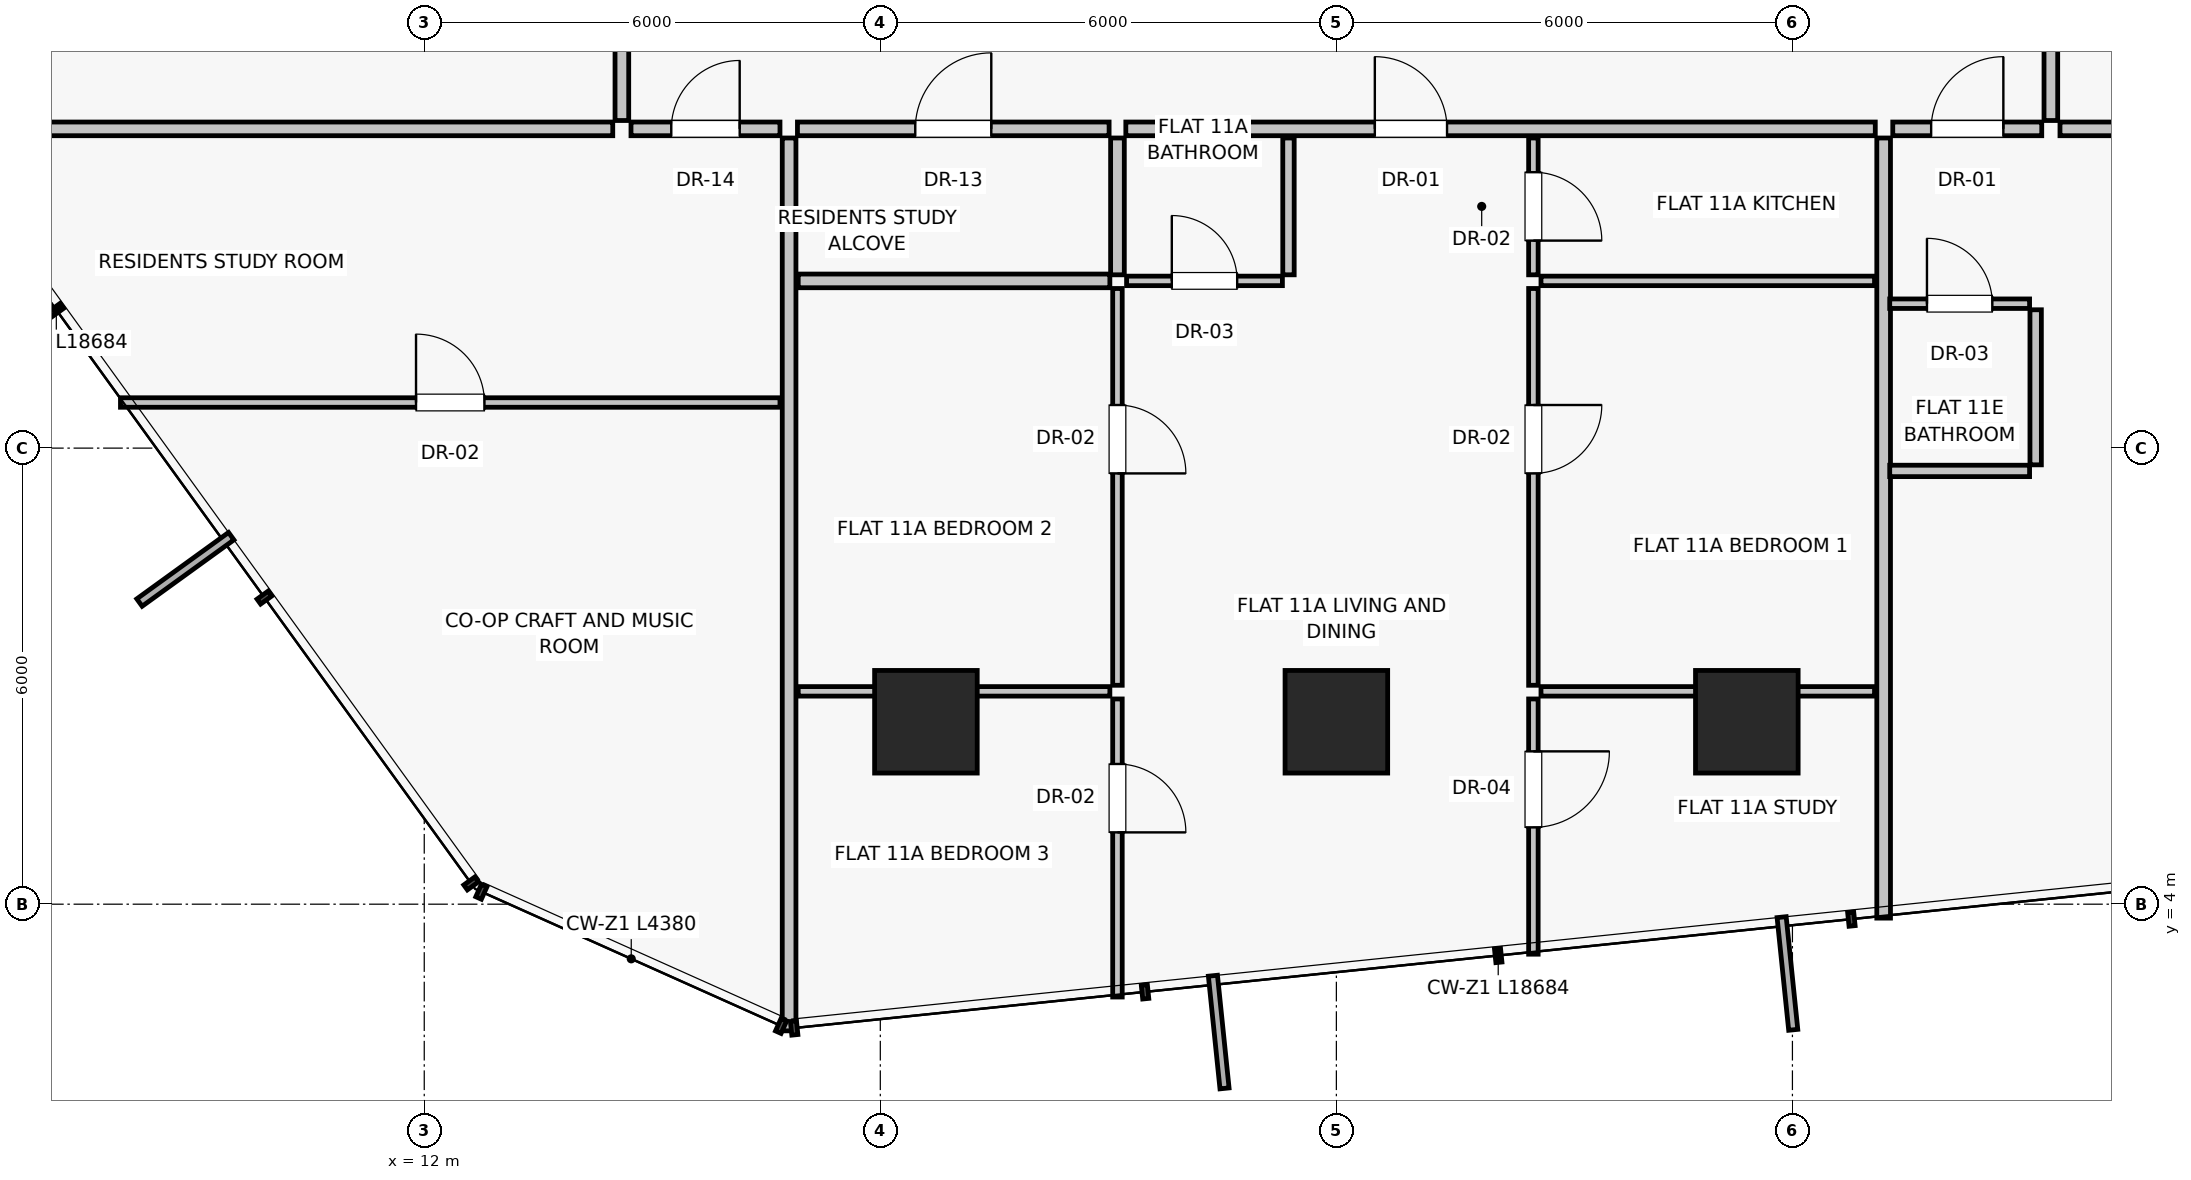
"""IFC4 building model, lengths in metres.
Left out: names, types, materials, properties, quantities, classifications, styles, units other than length and angle.
Written with IfcOpenShell. Run it as: python <this file> out.ifc"""

import sys

from ifc_helpers import new_model, si_unit, direction, frame, frame_2d, origin, origin_2d, place, context, subcontext, project, spatial, rectangle, extrude, source, transform, mapped, element, fill, save


model = new_model("IFC4")
c1 = context("Model", 3, precision=1e-05, world=origin(), true_north=direction((0.0, 1.0)))
c2 = subcontext(c1, "Body", "Model", "MODEL_VIEW")
j1 = project(units=[si_unit("LENGTHUNIT", "METRE"), si_unit("PLANEANGLEUNIT", "RADIAN")], contexts=[c1])
p1 = place(None, origin())
s1 = spatial("IfcSite", under=j1, at=p1, CompositionType="ELEMENT")
p2 = place(p1, origin())
s2 = spatial("IfcBuilding", under=s1, at=p2, CompositionType="ELEMENT")
p3 = place(p2, frame((0.0, 0.0, 43.55)))
s3 = spatial("IfcBuildingStorey", under=s2, at=p3, CompositionType="ELEMENT", Elevation=43.55)
for number, where, z_axis, x_axis in (
    (1, (18.6, 6.4, 0.0), (0.0, 0.0, 1.0), (1.0, 0.0, 0.0)),
    (2, (24.0, 6.4, 0.0), (0.0, 0.0, 1.0), (1.0, 0.0, 0.0)),
    (3, (29.4, 6.4, 0.0), (0.0, 0.0, 1.0), (1.0, 0.0, 0.0)),
):
    element("IfcColumn", number, at=place(p3, frame(where, z_axis=z_axis, x_axis=x_axis)), inside=s3, PredefinedType="COLUMN", context=c2, shape_type="SweptSolid", body=[
        extrude(rectangle(XDim=1.35, YDim=1.35, at=origin_2d()), origin(), (0.0, 0.0, 1.0), 3.25),
    ])
p4 = place(p3, frame((16.8, 14.08, 0.0), z_axis=(0.0, 0.0, 1.0), x_axis=(0.0, -1.0, 0.0)))
e4 = element("IfcWall", 4, at=p4, inside=s3, PredefinedType="PARTITIONING", context=c2, shape_type="SweptSolid", body=[
    extrude(rectangle(XDim=11.746, YDim=0.18, at=frame_2d((5.873, 0.0))), origin(), (0.0, 0.0, 1.0), 3.0),
])
p5 = place(p3, frame((31.2, 14.08, 0.0), z_axis=(0.0, 0.0, 1.0), x_axis=(0.0, -1.0, 0.0)))
e5 = element("IfcWall", 5, at=p5, inside=s3, PredefinedType="PARTITIONING", context=c2, shape_type="SweptSolid", body=[
    extrude(rectangle(XDim=10.263, YDim=0.18, at=frame_2d((5.132, 0.0))), origin(), (0.0, 0.0, 1.0), 3.0),
])
p6 = place(p3, frame((16.91, 14.2, 0.0), z_axis=(0.0, 0.0, 1.0), x_axis=(1.0, 0.0, 0.0)))
e6 = element("IfcWall", 6, at=p6, inside=s3, PredefinedType="PARTITIONING", context=c2, shape_type="SweptSolid", body=[
    extrude(rectangle(XDim=4.1, YDim=0.18, at=frame_2d((2.05, 0.0))), origin(), (0.0, 0.0, 1.0), 3.0),
])
p7 = place(p6, frame((1.55, 0.0, 0.0)))
e7 = element("IfcOpeningElement", 7, at=p7, cuts=e6, PredefinedType="OPENING", context=c2, shape_type="SweptSolid", body=[
    extrude(rectangle(XDim=1.0, YDim=2.01, at=frame_2d((0.5, 1.005))), frame((0.0, 0.1, 0.0), z_axis=(0.0, -1.0, 0.0), x_axis=(1.0, 0.0, 0.0)), (0.0, 0.0, 1.0), 0.2),
])
p8 = place(p3, frame((21.23, 14.2, 0.0), z_axis=(0.0, 0.0, 1.0), x_axis=(1.0, 0.0, 0.0)))
e8 = element("IfcWall", 8, at=p8, inside=s3, PredefinedType="PARTITIONING", context=c2, shape_type="SweptSolid", body=[
    extrude(rectangle(XDim=9.86, YDim=0.18, at=frame_2d((4.93, 0.0))), origin(), (0.0, 0.0, 1.0), 3.0),
])
p9 = place(p8, frame((3.276, 0.0, 0.0)))
e9 = element("IfcOpeningElement", 9, at=p9, cuts=e8, PredefinedType="OPENING", context=c2, shape_type="SweptSolid", body=[
    extrude(rectangle(XDim=0.95, YDim=2.02, at=frame_2d((0.475, 1.01))), frame((0.0, 0.1, 0.0), z_axis=(0.0, -1.0, 0.0), x_axis=(1.0, 0.0, 0.0)), (0.0, 0.0, 1.0), 0.2),
])
p10 = place(p3, frame((16.92, 6.8, 0.0), z_axis=(0.0, 0.0, 1.0), x_axis=(1.0, 0.0, 0.0)))
e10 = element("IfcWall", 10, at=p10, inside=s3, PredefinedType="PARTITIONING", context=c2, shape_type="SweptSolid", body=[
    extrude(rectangle(XDim=4.1, YDim=0.125, at=frame_2d((2.05, 0.0))), origin(), (0.0, 0.0, 1.0), 2.1),
])
p11 = place(p3, frame((21.12, 6.7, 0.0), z_axis=(0.0, 0.0, 1.0), x_axis=(0.0, -1.0, 0.0)))
e11 = element("IfcWall", 11, at=p11, inside=s3, PredefinedType="PARTITIONING", context=c2, shape_type="SweptSolid", body=[
    extrude(rectangle(XDim=3.921, YDim=0.125, at=frame_2d((1.96, 0.0))), origin(), (0.0, 0.0, 1.0), 3.0),
])
p12 = place(p11, frame((0.855, 0.0, 0.0)))
e12 = element("IfcOpeningElement", 12, at=p12, cuts=e11, PredefinedType="OPENING", context=c2, shape_type="SweptSolid", body=[
    extrude(rectangle(XDim=0.9, YDim=2.01, at=frame_2d((0.45, 1.005))), frame((0.0, 0.073, 0.0), z_axis=(0.0, -1.0, 0.0), x_axis=(1.0, 0.0, 0.0)), (0.0, 0.0, 1.0), 0.145),
])
p13 = place(p3, frame((26.692, 6.8, 0.0), z_axis=(0.0, 0.0, 1.0), x_axis=(1.0, 0.0, 0.0)))
e13 = element("IfcWall", 13, at=p13, inside=s3, PredefinedType="PARTITIONING", context=c2, shape_type="SweptSolid", body=[
    extrude(rectangle(XDim=4.388, YDim=0.125, at=frame_2d((2.194, 0.0))), origin(), (0.0, 0.0, 1.0), 2.1),
])
p14 = place(p3, frame((26.592, 6.7, 0.0), z_axis=(0.0, 0.0, 1.0), x_axis=(0.0, -1.0, 0.0)))
e14 = element("IfcWall", 14, at=p14, inside=s3, PredefinedType="PARTITIONING", context=c2, shape_type="SweptSolid", body=[
    extrude(rectangle(XDim=3.358, YDim=0.125, at=frame_2d((1.679, 0.0))), origin(), (0.0, 0.0, 1.0), 3.0),
])
p15 = place(p14, frame((0.689, 0.0, 0.0)))
e15 = element("IfcOpeningElement", 15, at=p15, cuts=e14, PredefinedType="OPENING", context=c2, shape_type="SweptSolid", body=[
    extrude(rectangle(XDim=1.0, YDim=2.01, at=frame_2d((0.5, 1.005))), frame((0.0, 0.073, 0.0), z_axis=(0.0, -1.0, 0.0), x_axis=(1.0, 0.0, 0.0)), (0.0, 0.0, 1.0), 0.145),
])
p16 = place(p3, frame((16.92, 12.2, 0.0), z_axis=(0.0, 0.0, 1.0), x_axis=(1.0, 0.0, 0.0)))
e16 = element("IfcWall", 16, at=p16, inside=s3, PredefinedType="PARTITIONING", context=c2, shape_type="SweptSolid", body=[
    extrude(rectangle(XDim=4.1, YDim=0.18, at=frame_2d((2.05, 0.0))), origin(), (0.0, 0.0, 1.0), 3.0),
])
p17 = place(p3, frame((21.12, 14.08, 0.0), z_axis=(0.0, 0.0, 1.0), x_axis=(0.0, -1.0, 0.0)))
e17 = element("IfcWall", 17, at=p17, inside=s3, PredefinedType="PARTITIONING", context=c2, shape_type="SweptSolid", body=[
    extrude(rectangle(XDim=1.8, YDim=0.18, at=frame_2d((0.9, 0.0))), origin(), (0.0, 0.0, 1.0), 3.0),
])
p18 = place(p3, frame((21.12, 12.1, 0.0), z_axis=(0.0, 0.0, 1.0), x_axis=(0.0, -1.0, 0.0)))
e18 = element("IfcWall", 18, at=p18, inside=s3, PredefinedType="PARTITIONING", context=c2, shape_type="SweptSolid", body=[
    extrude(rectangle(XDim=5.22, YDim=0.125, at=frame_2d((2.61, 0.0))), origin(), (0.0, 0.0, 1.0), 3.0),
])
p19 = place(p18, frame((1.533, 0.0, 0.0)))
e19 = element("IfcOpeningElement", 19, at=p19, cuts=e18, PredefinedType="OPENING", context=c2, shape_type="SweptSolid", body=[
    extrude(rectangle(XDim=0.9, YDim=2.01, at=frame_2d((0.45, 1.005))), frame((0.0, 0.073, 0.0), z_axis=(0.0, -1.0, 0.0), x_axis=(1.0, 0.0, 0.0)), (0.0, 0.0, 1.0), 0.145),
])
p20 = place(p3, frame((23.37, 14.08, 0.0), z_axis=(0.0, 0.0, 1.0), x_axis=(0.0, -1.0, 0.0)))
e20 = element("IfcWall", 20, at=p20, inside=s3, PredefinedType="PARTITIONING", context=c2, shape_type="SweptSolid", body=[
    extrude(rectangle(XDim=1.8, YDim=0.15, at=frame_2d((0.9, 0.0))), origin(), (0.0, 0.0, 1.0), 3.0),
])
p21 = place(p3, frame((21.24, 12.2, 0.0), z_axis=(0.0, 0.0, 1.0), x_axis=(1.0, 0.0, 0.0)))
e21 = element("IfcWall", 21, at=p21, inside=s3, PredefinedType="PARTITIONING", context=c2, shape_type="SweptSolid", body=[
    extrude(rectangle(XDim=2.05, YDim=0.125, at=frame_2d((1.025, 0.0))), origin(), (0.0, 0.0, 1.0), 3.0),
])
p22 = place(p21, frame((0.595, 0.0, 0.0)))
e22 = element("IfcOpeningElement", 22, at=p22, cuts=e21, PredefinedType="OPENING", context=c2, shape_type="SweptSolid", body=[
    extrude(rectangle(XDim=0.86, YDim=2.01, at=frame_2d((0.43, 1.005))), frame((0.0, 0.073, 0.0), z_axis=(0.0, -1.0, 0.0), x_axis=(1.0, 0.0, 0.0)), (0.0, 0.0, 1.0), 0.145),
])
p23 = place(p3, frame((26.592, 14.08, 0.0), z_axis=(0.0, 0.0, 1.0), x_axis=(0.0, -1.0, 0.0)))
e23 = element("IfcWall", 23, at=p23, inside=s3, PredefinedType="PARTITIONING", context=c2, shape_type="SweptSolid", body=[
    extrude(rectangle(XDim=1.8, YDim=0.125, at=frame_2d((0.9, 0.0))), origin(), (0.0, 0.0, 1.0), 3.0),
])
p24 = place(p23, frame((0.45, 0.0, 0.0)))
e24 = element("IfcOpeningElement", 24, at=p24, cuts=e23, PredefinedType="OPENING", context=c2, shape_type="SweptSolid", body=[
    extrude(rectangle(XDim=0.9, YDim=2.01, at=frame_2d((0.45, 1.005))), frame((0.0, 0.073, 0.0), z_axis=(0.0, -1.0, 0.0), x_axis=(1.0, 0.0, 0.0)), (0.0, 0.0, 1.0), 0.145),
])
p25 = place(p3, frame((26.692, 12.2, 0.0), z_axis=(0.0, 0.0, 1.0), x_axis=(1.0, 0.0, 0.0)))
e25 = element("IfcWall", 25, at=p25, inside=s3, PredefinedType="PARTITIONING", context=c2, shape_type="SweptSolid", body=[
    extrude(rectangle(XDim=4.388, YDim=0.125, at=frame_2d((2.194, 0.0))), origin(), (0.0, 0.0, 1.0), 3.0),
])
p26 = place(p3, frame((26.592, 12.1, 0.0), z_axis=(0.0, 0.0, 1.0), x_axis=(0.0, -1.0, 0.0)))
e26 = element("IfcWall", 26, at=p26, inside=s3, PredefinedType="PARTITIONING", context=c2, shape_type="SweptSolid", body=[
    extrude(rectangle(XDim=5.22, YDim=0.125, at=frame_2d((2.61, 0.0))), origin(), (0.0, 0.0, 1.0), 3.0),
])
p27 = place(p26, frame((1.533, 0.0, 0.0)))
e27 = element("IfcOpeningElement", 27, at=p27, cuts=e26, PredefinedType="OPENING", context=c2, shape_type="SweptSolid", body=[
    extrude(rectangle(XDim=0.9, YDim=2.01, at=frame_2d((0.45, 1.005))), frame((0.0, 0.073, 0.0), z_axis=(0.0, -1.0, 0.0), x_axis=(1.0, 0.0, 0.0)), (0.0, 0.0, 1.0), 0.145),
])
p28 = place(p3, frame((14.48, 14.2, 0.0), z_axis=(0.0, 0.0, 1.0), x_axis=(-1.0, 0.0, 0.0)))
e28 = element("IfcWall", 28, at=p28, inside=s3, PredefinedType="PARTITIONING", context=c2, shape_type="SweptSolid", body=[
    extrude(rectangle(XDim=9.08, YDim=0.18, at=frame_2d((4.54, 0.0))), origin(), (0.0, 0.0, 1.0), 3.0),
])
p29 = place(p3, frame((14.6, 14.31, 0.0), z_axis=(0.0, 0.0, 1.0), x_axis=(0.0, 1.0, 0.0)))
e29 = element("IfcWall", 29, at=p29, inside=s3, PredefinedType="PARTITIONING", context=c2, shape_type="SweptSolid", body=[
    extrude(rectangle(XDim=4.267, YDim=0.18, at=frame_2d((2.133, 0.0))), origin(), (0.0, 0.0, 1.0), 3.0),
])
p30 = place(p29, frame((1.634, 0.0, 0.0)))
e30 = element("IfcOpeningElement", 30, at=p30, cuts=e29, PredefinedType="OPENING", context=c2, shape_type="SweptSolid", body=[
    extrude(rectangle(XDim=1.0, YDim=2.01, at=frame_2d((0.5, 1.005))), frame((0.0, 0.1, 0.0), z_axis=(0.0, -1.0, 0.0), x_axis=(1.0, 0.0, 0.0)), (0.0, 0.0, 1.0), 0.2),
])
p31 = place(p3, frame((33.52, 14.2, 0.0), z_axis=(0.0, 0.0, 1.0), x_axis=(1.0, 0.0, 0.0)))
e31 = element("IfcWall", 31, at=p31, inside=s3, PredefinedType="PARTITIONING", context=c2, shape_type="SweptSolid", body=[
    extrude(rectangle(XDim=8.898, YDim=0.18, at=frame_2d((4.449, 0.0))), origin(), (0.0, 0.0, 1.0), 3.0),
])
p32 = place(p3, frame((33.4, 14.31, 0.0), z_axis=(0.0, 0.0, 1.0), x_axis=(0.0, 1.0, 0.0)))
e32 = element("IfcWall", 32, at=p32, inside=s3, PredefinedType="PARTITIONING", context=c2, shape_type="SweptSolid", body=[
    extrude(rectangle(XDim=12.108, YDim=0.18, at=frame_2d((6.054, 0.0))), origin(), (0.0, 0.0, 1.0), 3.0),
])
p33 = place(p32, frame((3.93, 0.0, 0.0)))
e33 = element("IfcOpeningElement", 33, at=p33, cuts=e32, PredefinedType="OPENING", context=c2, shape_type="SweptSolid", body=[
    extrude(rectangle(XDim=0.95, YDim=2.02, at=frame_2d((0.475, 1.01))), frame((0.0, 0.1, 0.0), z_axis=(0.0, -1.0, 0.0), x_axis=(1.0, 0.0, 0.0)), (0.0, 0.0, 1.0), 0.2),
])
p34 = place(p3, frame((14.72, 14.2, 0.0), z_axis=(0.0, 0.0, 1.0), x_axis=(1.0, 0.0, 0.0)))
e34 = element("IfcWall", 34, at=p34, inside=s3, PredefinedType="PARTITIONING", context=c2, shape_type="SweptSolid", body=[
    extrude(rectangle(XDim=1.96, YDim=0.18, at=frame_2d((0.98, 0.0))), origin(), (0.0, 0.0, 1.0), 3.0),
])
p35 = place(p34, frame((0.53, 0.0, 0.0)))
e35 = element("IfcOpeningElement", 35, at=p35, cuts=e34, PredefinedType="OPENING", context=c2, shape_type="SweptSolid", body=[
    extrude(rectangle(XDim=0.9, YDim=2.01, at=frame_2d((0.45, 1.005))), frame((0.0, 0.1, 0.0), z_axis=(0.0, -1.0, 0.0), x_axis=(1.0, 0.0, 0.0)), (0.0, 0.0, 1.0), 0.2),
])
p36 = place(p3, frame((8.004, 10.6, 0.0), z_axis=(0.0, 0.0, 1.0), x_axis=(1.0, 0.0, 0.0)))
e36 = element("IfcWall", 36, at=p36, inside=s3, PredefinedType="PARTITIONING", context=c2, shape_type="SweptSolid", body=[
    extrude(rectangle(XDim=8.676, YDim=0.125, at=frame_2d((4.338, 0.0))), origin(), (0.0, 0.0, 1.0), 3.0),
])
p37 = place(p36, frame((3.888, 0.0, 0.0)))
e37 = element("IfcOpeningElement", 37, at=p37, cuts=e36, PredefinedType="OPENING", context=c2, shape_type="SweptSolid", body=[
    extrude(rectangle(XDim=0.9, YDim=2.01, at=frame_2d((0.45, 1.005))), frame((0.0, 0.073, 0.0), z_axis=(0.0, -1.0, 0.0), x_axis=(1.0, 0.0, 0.0)), (0.0, 0.0, 1.0), 0.145),
])
p38 = place(p3, frame((31.32, 14.2, 0.0), z_axis=(0.0, 0.0, 1.0), x_axis=(1.0, 0.0, 0.0)))
e38 = element("IfcWall", 38, at=p38, inside=s3, PredefinedType="PARTITIONING", context=c2, shape_type="SweptSolid", body=[
    extrude(rectangle(XDim=1.96, YDim=0.18, at=frame_2d((0.98, 0.0))), origin(), (0.0, 0.0, 1.0), 3.0),
])
p39 = place(p38, frame((0.505, 0.0, 0.0)))
e39 = element("IfcOpeningElement", 39, at=p39, cuts=e38, PredefinedType="OPENING", context=c2, shape_type="SweptSolid", body=[
    extrude(rectangle(XDim=0.95, YDim=2.02, at=frame_2d((0.475, 1.01))), frame((0.0, 0.1, 0.0), z_axis=(0.0, -1.0, 0.0), x_axis=(1.0, 0.0, 0.0)), (0.0, 0.0, 1.0), 0.2),
])
p40 = place(p3, frame((31.28, 11.9, 0.0), z_axis=(0.0, 0.0, 1.0), x_axis=(1.0, 0.0, 0.0)))
e40 = element("IfcWall", 40, at=p40, inside=s3, PredefinedType="PARTITIONING", context=c2, shape_type="SweptSolid", body=[
    extrude(rectangle(XDim=1.84, YDim=0.125, at=frame_2d((0.92, 0.0))), origin(), (0.0, 0.0, 1.0), 3.0),
])
p41 = place(p40, frame((0.49, 0.0, 0.0)))
e41 = element("IfcOpeningElement", 41, at=p41, cuts=e40, PredefinedType="OPENING", context=c2, shape_type="SweptSolid", body=[
    extrude(rectangle(XDim=0.86, YDim=2.01, at=frame_2d((0.43, 1.005))), frame((0.0, 0.073, 0.0), z_axis=(0.0, -1.0, 0.0), x_axis=(1.0, 0.0, 0.0)), (0.0, 0.0, 1.0), 0.145),
])
p42 = place(p3, frame((31.28, 9.7, 0.0), z_axis=(0.0, 0.0, 1.0), x_axis=(1.0, 0.0, 0.0)))
e42 = element("IfcWall", 42, at=p42, inside=s3, PredefinedType="PARTITIONING", context=c2, shape_type="SweptSolid", body=[
    extrude(rectangle(XDim=1.84, YDim=0.15, at=frame_2d((0.92, 0.0))), origin(), (0.0, 0.0, 1.0), 3.0),
])
p43 = place(p3, frame((33.2, 9.78, 0.0), z_axis=(0.0, 0.0, 1.0), x_axis=(0.0, 1.0, 0.0)))
e43 = element("IfcWall", 43, at=p43, inside=s3, PredefinedType="PARTITIONING", context=c2, shape_type="SweptSolid", body=[
    extrude(rectangle(XDim=2.04, YDim=0.15, at=frame_2d((1.02, 0.0))), origin(), (0.0, 0.0, 1.0), 3.0),
])
m1 = source(origin(), c2, "Body", "SweptSolid", [
    extrude(rectangle(XDim=1.0, YDim=2.01, at=frame_2d((0.5, 1.005))), frame((0.0, 0.025, 0.0), z_axis=(0.0, -1.0, 0.0), x_axis=(1.0, 0.0, 0.0)), (0.0, 0.0, 1.0), 0.05),
])
p44 = place(p7, origin())
e44 = element("IfcDoor", 44, at=p44, inside=s3, OperationType="SINGLE_SWING_RIGHT", PredefinedType="DOOR", context=c2, shape_type="MappedRepresentation", body=[
    mapped(m1, transform((0.0, 0.0, 0.0), scale=1.0)),
])
fill(e7, e44)
m2 = source(origin(), c2, "Body", "SweptSolid", [
    extrude(rectangle(XDim=0.95, YDim=2.02, at=frame_2d((0.475, 1.01))), frame((0.0, 0.025, 0.0), z_axis=(0.0, -1.0, 0.0), x_axis=(1.0, 0.0, 0.0)), (0.0, 0.0, 1.0), 0.05),
])
p45 = place(p9, origin())
e45 = element("IfcDoor", 45, at=p45, inside=s3, OperationType="SINGLE_SWING_LEFT", PredefinedType="DOOR", context=c2, shape_type="MappedRepresentation", body=[
    mapped(m2, transform((0.0, 0.0, 0.0), scale=1.0)),
])
fill(e9, e45)
m3 = source(origin(), c2, "Body", "SweptSolid", [
    extrude(rectangle(XDim=0.9, YDim=2.01, at=frame_2d((0.45, 1.005))), frame((0.0, 0.025, 0.0), z_axis=(0.0, -1.0, 0.0), x_axis=(1.0, 0.0, 0.0)), (0.0, 0.0, 1.0), 0.05),
])
p46 = place(p12, origin())
e46 = element("IfcDoor", 46, at=p46, inside=s3, OperationType="SINGLE_SWING_RIGHT", PredefinedType="DOOR", context=c2, shape_type="MappedRepresentation", body=[
    mapped(m3, transform((0.0, 0.0, 0.0), scale=1.0)),
])
fill(e12, e46)
p47 = place(p15, origin())
e47 = element("IfcDoor", 47, at=p47, inside=s3, OperationType="SINGLE_SWING_LEFT", PredefinedType="DOOR", context=c2, shape_type="MappedRepresentation", body=[
    mapped(m1, transform((0.0, 0.0, 0.0), scale=1.0)),
])
fill(e15, e47)
p48 = place(p19, origin())
e48 = element("IfcDoor", 48, at=p48, inside=s3, OperationType="SINGLE_SWING_RIGHT", PredefinedType="DOOR", context=c2, shape_type="MappedRepresentation", body=[
    mapped(m3, transform((0.0, 0.0, 0.0), scale=1.0)),
])
fill(e19, e48)
m4 = source(origin(), c2, "Body", "SweptSolid", [
    extrude(rectangle(XDim=0.86, YDim=2.01, at=frame_2d((0.43, 1.005))), frame((0.0, 0.025, 0.0), z_axis=(0.0, -1.0, 0.0), x_axis=(1.0, 0.0, 0.0)), (0.0, 0.0, 1.0), 0.05),
])
p49 = place(p22, origin())
e49 = element("IfcDoor", 49, at=p49, inside=s3, OperationType="SINGLE_SWING_LEFT", PredefinedType="DOOR", context=c2, shape_type="MappedRepresentation", body=[
    mapped(m4, transform((0.0, 0.0, 0.0), scale=1.0)),
])
fill(e22, e49)
p50 = place(p24, origin())
e50 = element("IfcDoor", 50, at=p50, inside=s3, OperationType="SINGLE_SWING_RIGHT", PredefinedType="DOOR", context=c2, shape_type="MappedRepresentation", body=[
    mapped(m3, transform((0.0, 0.0, 0.0), scale=1.0)),
])
fill(e24, e50)
p51 = place(p27, origin())
e51 = element("IfcDoor", 51, at=p51, inside=s3, OperationType="SINGLE_SWING_LEFT", PredefinedType="DOOR", context=c2, shape_type="MappedRepresentation", body=[
    mapped(m3, transform((0.0, 0.0, 0.0), scale=1.0)),
])
fill(e27, e51)
p52 = place(p35, origin())
e52 = element("IfcDoor", 52, at=p52, inside=s3, OperationType="SINGLE_SWING_RIGHT", PredefinedType="DOOR", context=c2, shape_type="MappedRepresentation", body=[
    mapped(m3, transform((0.0, 0.0, 0.0), scale=1.0)),
])
fill(e35, e52)
p53 = place(p37, origin())
e53 = element("IfcDoor", 53, at=p53, inside=s3, OperationType="SINGLE_SWING_LEFT", PredefinedType="DOOR", context=c2, shape_type="MappedRepresentation", body=[
    mapped(m3, transform((0.0, 0.0, 0.0), scale=1.0)),
])
fill(e37, e53)
p54 = place(p39, origin())
e54 = element("IfcDoor", 54, at=p54, inside=s3, OperationType="SINGLE_SWING_RIGHT", PredefinedType="DOOR", context=c2, shape_type="MappedRepresentation", body=[
    mapped(m2, transform((0.0, 0.0, 0.0), scale=1.0)),
])
fill(e39, e54)
p55 = place(p41, origin())
e55 = element("IfcDoor", 55, at=p55, inside=s3, OperationType="SINGLE_SWING_LEFT", PredefinedType="DOOR", context=c2, shape_type="MappedRepresentation", body=[
    mapped(m4, transform((0.0, 0.0, 0.0), scale=1.0)),
])
fill(e41, e55)
save(model, sys.argv[1])
